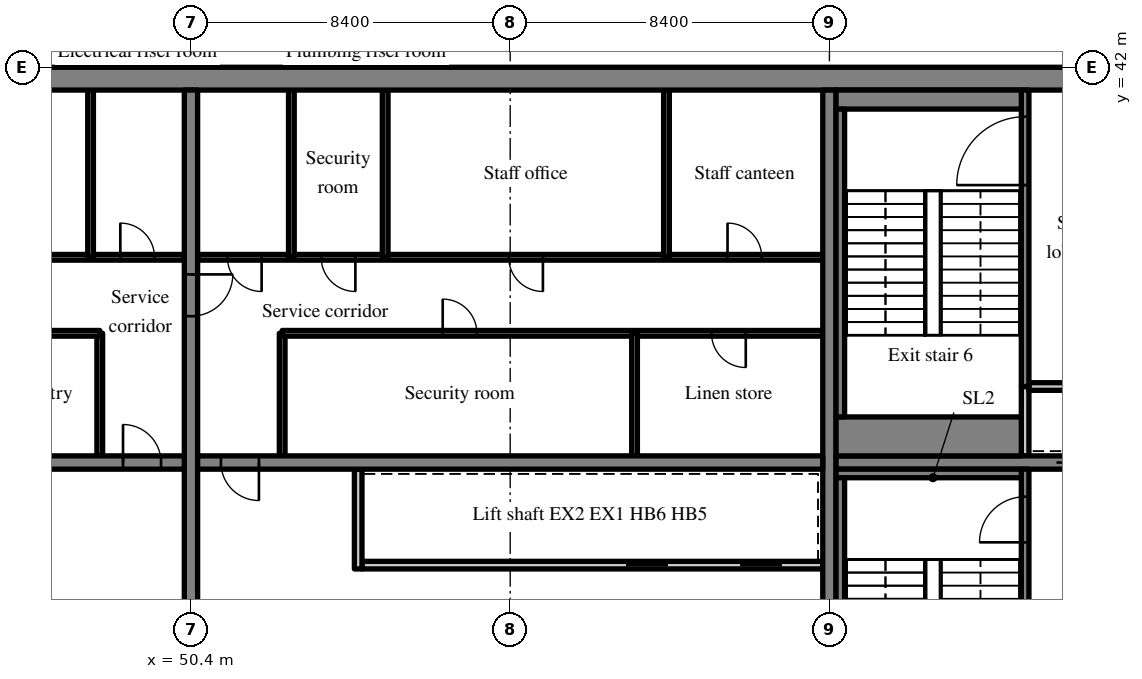
"""IFC4 building model, lengths in metres.
Left out: names, types, materials, properties, quantities, classifications, styles, units other than length and angle.
Written with IfcOpenShell. Run it as: python <this file> out.ifc"""

import sys

from ifc_helpers import new_model, si_unit, direction, frame, frame_2d, origin, place, context, subcontext, project, spatial, rectangle, extrude, source, transform, mapped, element, fill, save


model = new_model("IFC4")
c1 = context("Model", 3, precision=1e-05, world=origin(), true_north=direction((0.0, 1.0)))
c2 = subcontext(c1, "Body", "Model", "MODEL_VIEW")
j1 = project(units=[si_unit("LENGTHUNIT", "METRE"), si_unit("PLANEANGLEUNIT", "RADIAN")], contexts=[c1])
p1 = place(None, origin())
s1 = spatial("IfcSite", under=j1, at=p1, CompositionType="ELEMENT")
p2 = place(p1, origin())
s2 = spatial("IfcBuilding", under=s1, at=p2, CompositionType="ELEMENT")
p3 = place(p2, frame((0.0, 0.0, 241.3)))
s3 = spatial("IfcBuildingStorey", under=s2, at=p3, CompositionType="ELEMENT", Elevation=241.3)
m1 = source(origin(), c2, "Body", "SweptSolid", [
    extrude(rectangle(XDim=50.4, YDim=0.6, at=frame_2d((25.2, 0.0))), origin(), (0.0, 0.0, 1.0), 3.62),
])
p4 = place(p3, frame((25.2, 41.7, 0.0), z_axis=(0.0, 0.0, 1.0), x_axis=(1.0, 0.0, 0.0)))
e1 = element("IfcWall", 1, at=p4, inside=s3, PredefinedType="SHEAR", context=c2, shape_type="MappedRepresentation", body=[
    mapped(m1, transform((0.0, 0.0, 0.0), scale=1.0)),
])
m2 = source(origin(), c2, "Body", "SweptSolid", [
    extrude(rectangle(XDim=18.8, YDim=0.35, at=frame_2d((9.4, 0.0))), origin(), (0.0, 0.0, 1.0), 3.62),
])
p5 = place(p3, frame((50.4, 22.6, 0.0), z_axis=(0.0, 0.0, 1.0), x_axis=(0.0, 1.0, 0.0)))
e2 = element("IfcWall", 2, at=p5, inside=s3, PredefinedType="SHEAR", context=c2, shape_type="MappedRepresentation", body=[
    mapped(m2, transform((0.0, 0.0, 0.0), scale=1.0)),
])
m3 = source(origin(), c2, "Body", "SweptSolid", [
    extrude(rectangle(XDim=1.1, YDim=2.1, at=frame_2d((0.55, 1.05))), frame((0.0, 0.185, 0.0), z_axis=(0.0, -1.0, 0.0), x_axis=(1.0, 0.0, 0.0)), (0.0, 0.0, 1.0), 0.37),
])
p6 = place(p5, frame((12.85, 0.0, 0.0)))
e3 = element("IfcOpeningElement", 3, at=p6, cuts=e2, PredefinedType="OPENING", context=c2, shape_type="MappedRepresentation", body=[
    mapped(m3, transform((0.0, 0.0, 0.0), scale=1.0)),
])
p7 = place(p3, frame((67.2, 22.6, 0.0), z_axis=(0.0, 0.0, 1.0), x_axis=(0.0, 1.0, 0.0)))
e4 = element("IfcWall", 4, at=p7, inside=s3, PredefinedType="SHEAR", context=c2, shape_type="MappedRepresentation", body=[
    mapped(m2, transform((0.0, 0.0, 0.0), scale=1.0)),
])
m4 = source(origin(), c2, "Body", "SweptSolid", [
    extrude(rectangle(XDim=16.45, YDim=0.35, at=frame_2d((8.225, 0.0))), origin(), (0.0, 0.0, 1.0), 3.62),
])
p8 = place(p3, frame((33.775, 31.6, 0.0), z_axis=(0.0, 0.0, 1.0), x_axis=(1.0, 0.0, 0.0)))
e5 = element("IfcWall", 5, at=p8, inside=s3, PredefinedType="SHEAR", context=c2, shape_type="MappedRepresentation", body=[
    mapped(m4, transform((0.0, 0.0, 0.0), scale=1.0)),
])
m5 = source(origin(), c2, "Body", "SweptSolid", [
    extrude(rectangle(XDim=1.0, YDim=2.1, at=frame_2d((0.5, 1.05))), frame((0.0, 0.185, 0.0), z_axis=(0.0, -1.0, 0.0), x_axis=(1.0, 0.0, 0.0)), (0.0, 0.0, 1.0), 0.37),
])
p9 = place(p8, frame((14.837, 0.0, 0.0)))
e6 = element("IfcOpeningElement", 6, at=p9, cuts=e5, PredefinedType="OPENING", context=c2, shape_type="MappedRepresentation", body=[
    mapped(m5, transform((0.0, 0.0, 0.0), scale=1.0)),
])
m6 = source(origin(), c2, "Body", "SweptSolid", [
    extrude(rectangle(XDim=16.45, YDim=0.35, at=frame_2d((8.225, 0.0))), origin(), (0.0, 0.0, 1.0), 3.62),
])
p10 = place(p3, frame((50.575, 31.6, 0.0), z_axis=(0.0, 0.0, 1.0), x_axis=(1.0, 0.0, 0.0)))
e7 = element("IfcWall", 7, at=p10, inside=s3, PredefinedType="SHEAR", context=c2, shape_type="MappedRepresentation", body=[
    mapped(m6, transform((0.0, 0.0, 0.0), scale=1.0)),
])
p11 = place(p10, frame((0.613, 0.0, 0.0)))
e8 = element("IfcOpeningElement", 8, at=p11, cuts=e7, PredefinedType="OPENING", context=c2, shape_type="MappedRepresentation", body=[
    mapped(m5, transform((0.0, 0.0, 0.0), scale=1.0)),
])
m7 = source(origin(), c2, "Body", "SweptSolid", [
    extrude(rectangle(XDim=7.625, YDim=0.35, at=frame_2d((3.812, 0.0))), origin(), (0.0, 0.0, 1.0), 3.62),
])
p12 = place(p3, frame((67.375, 31.6, 0.0), z_axis=(0.0, 0.0, 1.0), x_axis=(1.0, 0.0, 0.0)))
e9 = element("IfcWall", 9, at=p12, inside=s3, PredefinedType="SHEAR", context=c2, shape_type="MappedRepresentation", body=[
    mapped(m7, transform((0.0, 0.0, 0.0), scale=1.0)),
])
p13 = place(p12, frame((5.8, 0.0, 0.0)))
e10 = element("IfcOpeningElement", 10, at=p13, cuts=e9, PredefinedType="OPENING", context=c2, shape_type="MappedRepresentation", body=[
    mapped(m3, transform((0.0, 0.0, 0.0), scale=1.0)),
])
m8 = source(origin(), c2, "Body", "SweptSolid", [
    extrude(rectangle(XDim=3.225, YDim=0.15, at=frame_2d((1.613, 0.0))), origin(), (0.0, 0.0, 1.0), 3.62),
])
p14 = place(p3, frame((48.0, 31.775, 0.0), z_axis=(0.0, 0.0, 1.0), x_axis=(0.0, 1.0, 0.0)))
e11 = element("IfcWall", 11, at=p14, inside=s3, PredefinedType="PARTITIONING", context=c2, shape_type="MappedRepresentation", body=[
    mapped(m8, transform((0.0, 0.0, 0.0), scale=1.0)),
])
m9 = source(origin(), c2, "Body", "SweptSolid", [
    extrude(rectangle(XDim=14.225, YDim=0.15, at=frame_2d((7.113, 0.0))), origin(), (0.0, 0.0, 1.0), 3.62),
])
p15 = place(p3, frame((33.775, 35.0, 0.0), z_axis=(0.0, 0.0, 1.0), x_axis=(1.0, 0.0, 0.0)))
e12 = element("IfcWall", 12, at=p15, inside=s3, PredefinedType="PARTITIONING", context=c2, shape_type="MappedRepresentation", body=[
    mapped(m9, transform((0.0, 0.0, 0.0), scale=1.0)),
])
m10 = source(origin(), c2, "Body", "SweptSolid", [
    extrude(rectangle(XDim=0.9, YDim=2.1, at=frame_2d((0.45, 1.05))), frame((0.0, 0.085, 0.0), z_axis=(0.0, -1.0, 0.0), x_axis=(1.0, 0.0, 0.0)), (0.0, 0.0, 1.0), 0.17),
])
p16 = place(p15, frame((0.965, 0.0, 0.0)))
e13 = element("IfcOpeningElement", 13, at=p16, cuts=e12, PredefinedType="OPENING", context=c2, shape_type="MappedRepresentation", body=[
    mapped(m10, transform((0.0, 0.0, 0.0), scale=1.0)),
])
p17 = place(p15, frame((5.917, 0.0, 0.0)))
e14 = element("IfcOpeningElement", 14, at=p17, cuts=e12, PredefinedType="OPENING", context=c2, shape_type="MappedRepresentation", body=[
    mapped(m10, transform((0.0, 0.0, 0.0), scale=1.0)),
])
p18 = place(p15, frame((11.577, 0.0, 0.0)))
e15 = element("IfcOpeningElement", 15, at=p18, cuts=e12, PredefinedType="OPENING", context=c2, shape_type="MappedRepresentation", body=[
    mapped(m10, transform((0.0, 0.0, 0.0), scale=1.0)),
])
m11 = source(origin(), c2, "Body", "SweptSolid", [
    extrude(rectangle(XDim=16.45, YDim=0.15, at=frame_2d((8.225, 0.0))), origin(), (0.0, 0.0, 1.0), 3.62),
])
p19 = place(p3, frame((33.775, 37.0, 0.0), z_axis=(0.0, 0.0, 1.0), x_axis=(1.0, 0.0, 0.0)))
e16 = element("IfcWall", 16, at=p19, inside=s3, PredefinedType="PARTITIONING", context=c2, shape_type="MappedRepresentation", body=[
    mapped(m11, transform((0.0, 0.0, 0.0), scale=1.0)),
])
p20 = place(p19, frame((6.541, 0.0, 0.0)))
e17 = element("IfcOpeningElement", 17, at=p20, cuts=e16, PredefinedType="OPENING", context=c2, shape_type="MappedRepresentation", body=[
    mapped(m10, transform((0.0, 0.0, 0.0), scale=1.0)),
])
p21 = place(p19, frame((14.766, 0.0, 0.0)))
e18 = element("IfcOpeningElement", 18, at=p21, cuts=e16, PredefinedType="OPENING", context=c2, shape_type="MappedRepresentation", body=[
    mapped(m10, transform((0.0, 0.0, 0.0), scale=1.0)),
])
m12 = source(origin(), c2, "Body", "SweptSolid", [
    extrude(rectangle(XDim=4.4, YDim=0.15, at=frame_2d((2.2, 0.0))), origin(), (0.0, 0.0, 1.0), 3.62),
])
p22 = place(p3, frame((47.758, 37.0, 0.0), z_axis=(0.0, 0.0, 1.0), x_axis=(0.0, 1.0, 0.0)))
e19 = element("IfcWall", 19, at=p22, inside=s3, PredefinedType="PARTITIONING", context=c2, shape_type="MappedRepresentation", body=[
    mapped(m12, transform((0.0, 0.0, 0.0), scale=1.0)),
])
m13 = source(origin(), c2, "Body", "SweptSolid", [
    extrude(rectangle(XDim=12.125, YDim=0.2, at=frame_2d((6.062, 0.0))), origin(), (0.0, 0.0, 1.0), 3.62),
])
p23 = place(p3, frame((67.025, 28.9, 0.0), z_axis=(0.0, 0.0, 1.0), x_axis=(-1.0, 0.0, 0.0)))
e20 = element("IfcWall", 20, at=p23, inside=s3, PredefinedType="SOLIDWALL", context=c2, shape_type="MappedRepresentation", body=[
    mapped(m13, transform((0.0, 0.0, 0.0), scale=1.0)),
])
m14 = source(origin(), c2, "Body", "SweptSolid", [
    extrude(rectangle(XDim=1.1, YDim=2.1, at=frame_2d((0.55, 1.05))), frame((0.0, 0.11, 0.0), z_axis=(0.0, -1.0, 0.0), x_axis=(1.0, 0.0, 0.0)), (0.0, 0.0, 1.0), 0.22),
])
p24 = place(p23, frame((1.075, 0.0, 0.0)))
e21 = element("IfcOpeningElement", 21, at=p24, cuts=e20, PredefinedType="OPENING", context=c2, shape_type="MappedRepresentation", body=[
    mapped(m14, transform((0.0, 0.0, 0.0), scale=1.0)),
])
p25 = place(p23, frame((4.075, 0.0, 0.0)))
e22 = element("IfcOpeningElement", 22, at=p25, cuts=e20, PredefinedType="OPENING", context=c2, shape_type="MappedRepresentation", body=[
    mapped(m14, transform((0.0, 0.0, 0.0), scale=1.0)),
])
m15 = source(origin(), c2, "Body", "SweptSolid", [
    extrude(rectangle(XDim=2.625, YDim=0.2, at=frame_2d((1.312, 0.0))), origin(), (0.0, 0.0, 1.0), 3.62),
])
p26 = place(p3, frame((54.8, 28.8, 0.0), z_axis=(0.0, 0.0, 1.0), x_axis=(0.0, 1.0, 0.0)))
e23 = element("IfcWall", 23, at=p26, inside=s3, PredefinedType="SOLIDWALL", context=c2, shape_type="MappedRepresentation", body=[
    mapped(m15, transform((0.0, 0.0, 0.0), scale=1.0)),
])
p27 = place(p3, frame((52.8, 31.775, 0.0), z_axis=(0.0, 0.0, 1.0), x_axis=(0.0, 1.0, 0.0)))
e24 = element("IfcWall", 24, at=p27, inside=s3, PredefinedType="PARTITIONING", context=c2, shape_type="MappedRepresentation", body=[
    mapped(m8, transform((0.0, 0.0, 0.0), scale=1.0)),
])
m16 = source(origin(), c2, "Body", "SweptSolid", [
    extrude(rectangle(XDim=14.225, YDim=0.15, at=frame_2d((7.112, 0.0))), origin(), (0.0, 0.0, 1.0), 3.62),
])
p28 = place(p3, frame((67.025, 35.0, 0.0), z_axis=(0.0, 0.0, 1.0), x_axis=(-1.0, 0.0, 0.0)))
e25 = element("IfcWall", 25, at=p28, inside=s3, PredefinedType="PARTITIONING", context=c2, shape_type="MappedRepresentation", body=[
    mapped(m16, transform((0.0, 0.0, 0.0), scale=1.0)),
])
p29 = place(p28, frame((2.026, 0.0, 0.0)))
e26 = element("IfcOpeningElement", 26, at=p29, cuts=e25, PredefinedType="OPENING", context=c2, shape_type="MappedRepresentation", body=[
    mapped(m10, transform((0.0, 0.0, 0.0), scale=1.0)),
])
p30 = place(p28, frame((9.101, 0.0, 0.0)))
e27 = element("IfcOpeningElement", 27, at=p30, cuts=e25, PredefinedType="OPENING", context=c2, shape_type="MappedRepresentation", body=[
    mapped(m10, transform((0.0, 0.0, 0.0), scale=1.0)),
])
m17 = source(origin(), c2, "Body", "SweptSolid", [
    extrude(rectangle(XDim=16.45, YDim=0.15, at=frame_2d((8.225, 0.0))), origin(), (0.0, 0.0, 1.0), 3.62),
])
p31 = place(p3, frame((67.025, 37.0, 0.0), z_axis=(0.0, 0.0, 1.0), x_axis=(-1.0, 0.0, 0.0)))
e28 = element("IfcWall", 28, at=p31, inside=s3, PredefinedType="PARTITIONING", context=c2, shape_type="MappedRepresentation", body=[
    mapped(m17, transform((0.0, 0.0, 0.0), scale=1.0)),
])
p32 = place(p31, frame((1.606, 0.0, 0.0)))
e29 = element("IfcOpeningElement", 29, at=p32, cuts=e28, PredefinedType="OPENING", context=c2, shape_type="MappedRepresentation", body=[
    mapped(m10, transform((0.0, 0.0, 0.0), scale=1.0)),
])
p33 = place(p31, frame((7.364, 0.0, 0.0)))
e30 = element("IfcOpeningElement", 30, at=p33, cuts=e28, PredefinedType="OPENING", context=c2, shape_type="MappedRepresentation", body=[
    mapped(m10, transform((0.0, 0.0, 0.0), scale=1.0)),
])
p34 = place(p31, frame((12.299, 0.0, 0.0)))
e31 = element("IfcOpeningElement", 31, at=p34, cuts=e28, PredefinedType="OPENING", context=c2, shape_type="MappedRepresentation", body=[
    mapped(m10, transform((0.0, 0.0, 0.0), scale=1.0)),
])
p35 = place(p31, frame((14.766, 0.0, 0.0)))
e32 = element("IfcOpeningElement", 32, at=p35, cuts=e28, PredefinedType="OPENING", context=c2, shape_type="MappedRepresentation", body=[
    mapped(m10, transform((0.0, 0.0, 0.0), scale=1.0)),
])
p36 = place(p3, frame((62.072, 31.775, 0.0), z_axis=(0.0, 0.0, 1.0), x_axis=(0.0, 1.0, 0.0)))
e33 = element("IfcWall", 33, at=p36, inside=s3, PredefinedType="PARTITIONING", context=c2, shape_type="MappedRepresentation", body=[
    mapped(m8, transform((0.0, 0.0, 0.0), scale=1.0)),
])
for number, where, z_axis, x_axis in (
    (34, (62.912, 37.0, 0.0), (0.0, 0.0, 1.0), (0.0, 1.0, 0.0)),
    (35, (55.51, 37.0, 0.0), (0.0, 0.0, 1.0), (0.0, 1.0, 0.0)),
    (36, (53.042, 37.0, 0.0), (0.0, 0.0, 1.0), (0.0, 1.0, 0.0)),
):
    element("IfcWall", number, at=place(p3, frame(where, z_axis=z_axis, x_axis=x_axis)), inside=s3, PredefinedType="PARTITIONING", context=c2, shape_type="MappedRepresentation", body=[
        mapped(m12, transform((0.0, 0.0, 0.0), scale=1.0)),
    ])
m18 = source(origin(), c2, "Body", "SweptSolid", [
    extrude(rectangle(XDim=8.825, YDim=0.2, at=frame_2d((4.413, 0.0))), origin(), (0.0, 0.0, 1.0), 3.62),
])
p37 = place(p3, frame((72.35, 22.6, 0.0), z_axis=(0.0, 0.0, 1.0), x_axis=(0.0, 1.0, 0.0)))
e37 = element("IfcWall", 37, at=p37, inside=s3, PredefinedType="SOLIDWALL", context=c2, shape_type="MappedRepresentation", body=[
    mapped(m18, transform((0.0, 0.0, 0.0), scale=1.0)),
])
m19 = source(origin(), c2, "Body", "SweptSolid", [
    extrude(rectangle(XDim=1.2, YDim=2.1, at=frame_2d((0.6, 1.05))), frame((0.0, 0.11, 0.0), z_axis=(0.0, -1.0, 0.0), x_axis=(1.0, 0.0, 0.0)), (0.0, 0.0, 1.0), 0.22),
])
p38 = place(p37, frame((6.9, 0.0, 0.0)))
e38 = element("IfcOpeningElement", 38, at=p38, cuts=e37, PredefinedType="OPENING", context=c2, shape_type="MappedRepresentation", body=[
    mapped(m19, transform((0.0, 0.0, 0.0), scale=1.0)),
])
m20 = source(origin(), c2, "Body", "SweptSolid", [
    extrude(rectangle(XDim=1.825, YDim=0.2, at=frame_2d((0.913, 0.0))), origin(), (0.0, 0.0, 1.0), 3.62),
])
p39 = place(p3, frame((72.35, 31.775, 0.0), z_axis=(0.0, 0.0, 1.0), x_axis=(0.0, 1.0, 0.0)))
e39 = element("IfcWall", 39, at=p39, inside=s3, PredefinedType="SOLIDWALL", context=c2, shape_type="MappedRepresentation", body=[
    mapped(m20, transform((0.0, 0.0, 0.0), scale=1.0)),
])
m21 = source(origin(), c2, "Body", "SweptSolid", [
    extrude(rectangle(XDim=2.55, YDim=0.2, at=frame_2d((1.275, 0.0))), origin(), (0.0, 0.0, 1.0), 3.62),
])
p40 = place(p3, frame((72.45, 33.6, 0.0), z_axis=(0.0, 0.0, 1.0), x_axis=(1.0, 0.0, 0.0)))
e40 = element("IfcWall", 40, at=p40, inside=s3, PredefinedType="SOLIDWALL", context=c2, shape_type="MappedRepresentation", body=[
    mapped(m21, transform((0.0, 0.0, 0.0), scale=1.0)),
])
m22 = source(origin(), c2, "Body", "SweptSolid", [
    extrude(rectangle(XDim=7.8, YDim=0.2, at=frame_2d((3.9, 0.0))), origin(), (0.0, 0.0, 1.0), 3.62),
])
p41 = place(p3, frame((72.35, 33.6, 0.0), z_axis=(0.0, 0.0, 1.0), x_axis=(0.0, 1.0, 0.0)))
e41 = element("IfcWall", 41, at=p41, inside=s3, PredefinedType="SOLIDWALL", context=c2, shape_type="MappedRepresentation", body=[
    mapped(m22, transform((0.0, 0.0, 0.0), scale=1.0)),
])
m23 = source(origin(), c2, "Body", "SweptSolid", [
    extrude(rectangle(XDim=1.8, YDim=2.1, at=frame_2d((0.9, 1.05))), frame((0.0, 0.11, 0.0), z_axis=(0.0, -1.0, 0.0), x_axis=(1.0, 0.0, 0.0)), (0.0, 0.0, 1.0), 0.22),
])
p42 = place(p41, frame((5.3, 0.0, 0.0)))
e42 = element("IfcOpeningElement", 42, at=p42, cuts=e41, PredefinedType="OPENING", context=c2, shape_type="MappedRepresentation", body=[
    mapped(m23, transform((0.0, 0.0, 0.0), scale=1.0)),
])
m24 = source(origin(), c2, "Body", "SweptSolid", [
    extrude(rectangle(XDim=4.875, YDim=0.225, at=frame_2d((2.438, 0.0))), origin(), (0.0, 0.0, 1.0), 3.62),
])
p43 = place(p3, frame((67.375, 31.312, 0.0), z_axis=(0.0, 0.0, 1.0), x_axis=(1.0, 0.0, 0.0)))
e43 = element("IfcWall", 43, at=p43, inside=s3, PredefinedType="SOLIDWALL", context=c2, shape_type="MappedRepresentation", body=[
    mapped(m24, transform((0.0, 0.0, 0.0), scale=1.0)),
])
m25 = source(origin(), c2, "Body", "SweptSolid", [
    extrude(rectangle(XDim=8.1, YDim=0.225, at=frame_2d((4.05, 0.0))), origin(), (0.0, 0.0, 1.0), 3.62),
])
p44 = place(p3, frame((67.487, 23.1, 0.0), z_axis=(0.0, 0.0, 1.0), x_axis=(0.0, 1.0, 0.0)))
e44 = element("IfcWall", 44, at=p44, inside=s3, PredefinedType="SOLIDWALL", context=c2, shape_type="MappedRepresentation", body=[
    mapped(m25, transform((0.0, 0.0, 0.0), scale=1.0)),
])
m26 = source(origin(), c2, "Body", "SweptSolid", [
    extrude(rectangle(XDim=4.875, YDim=0.5, at=frame_2d((2.438, 0.0))), origin(), (0.0, 0.0, 1.0), 3.62),
])
p45 = place(p3, frame((67.375, 41.15, 0.0), z_axis=(0.0, 0.0, 1.0), x_axis=(1.0, 0.0, 0.0)))
e45 = element("IfcWall", 45, at=p45, inside=s3, PredefinedType="SOLIDWALL", context=c2, shape_type="MappedRepresentation", body=[
    mapped(m26, transform((0.0, 0.0, 0.0), scale=1.0)),
])
m27 = source(origin(), c2, "Body", "SweptSolid", [
    extrude(rectangle(XDim=4.875, YDim=1.025, at=frame_2d((2.438, 0.0))), origin(), (0.0, 0.0, 1.0), 3.62),
])
p46 = place(p3, frame((67.375, 32.287, 0.0), z_axis=(0.0, 0.0, 1.0), x_axis=(1.0, 0.0, 0.0)))
e46 = element("IfcWall", 46, at=p46, inside=s3, PredefinedType="SOLIDWALL", context=c2, shape_type="MappedRepresentation", body=[
    mapped(m27, transform((0.0, 0.0, 0.0), scale=1.0)),
])
p47 = place(p3, frame((67.487, 32.8, 0.0), z_axis=(0.0, 0.0, 1.0), x_axis=(0.0, 1.0, 0.0)))
e47 = element("IfcWall", 47, at=p47, inside=s3, PredefinedType="SOLIDWALL", context=c2, shape_type="MappedRepresentation", body=[
    mapped(m25, transform((0.0, 0.0, 0.0), scale=1.0)),
])
m28 = source(origin(), c2, "Body", "SweptSolid", [
    extrude(rectangle(XDim=1.0, YDim=2.1, at=frame_2d((0.5, 1.05))), frame((0.0, 0.025, 0.0), z_axis=(0.0, -1.0, 0.0), x_axis=(1.0, 0.0, 0.0)), (0.0, 0.0, 1.0), 0.05),
])
p48 = place(p9, origin())
e48 = element("IfcDoor", 48, at=p48, inside=s3, OperationType="SINGLE_SWING_LEFT", PredefinedType="DOOR", context=c2, shape_type="MappedRepresentation", body=[
    mapped(m28, transform((0.0, 0.0, 0.0), scale=1.0)),
])
fill(e6, e48)
m29 = source(origin(), c2, "Body", "SweptSolid", [
    extrude(rectangle(XDim=0.9, YDim=2.1, at=frame_2d((0.45, 1.05))), frame((0.0, 0.025, 0.0), z_axis=(0.0, -1.0, 0.0), x_axis=(1.0, 0.0, 0.0)), (0.0, 0.0, 1.0), 0.05),
])
p49 = place(p21, origin())
e49 = element("IfcDoor", 49, at=p49, inside=s3, OperationType="SINGLE_SWING_LEFT", PredefinedType="DOOR", context=c2, shape_type="MappedRepresentation", body=[
    mapped(m29, transform((0.0, 0.0, 0.0), scale=1.0)),
])
fill(e18, e49)
p50 = place(p11, origin())
e50 = element("IfcDoor", 50, at=p50, inside=s3, OperationType="SINGLE_SWING_RIGHT", PredefinedType="DOOR", context=c2, shape_type="MappedRepresentation", body=[
    mapped(m28, transform((0.0, 0.0, 0.0), scale=1.0)),
])
fill(e8, e50)
m30 = source(origin(), c2, "Body", "SweptSolid", [
    extrude(rectangle(XDim=1.1, YDim=2.1, at=frame_2d((0.55, 1.05))), frame((0.0, 0.025, 0.0), z_axis=(0.0, -1.0, 0.0), x_axis=(1.0, 0.0, 0.0)), (0.0, 0.0, 1.0), 0.05),
])
p51 = place(p24, origin())
e51 = element("IfcDoor", 51, at=p51, inside=s3, OperationType="SLIDING_TO_RIGHT", PredefinedType="DOOR", context=c2, shape_type="MappedRepresentation", body=[
    mapped(m30, transform((0.0, 0.0, 0.0), scale=1.0)),
])
fill(e21, e51)
p52 = place(p25, origin())
e52 = element("IfcDoor", 52, at=p52, inside=s3, OperationType="SLIDING_TO_LEFT", PredefinedType="DOOR", context=c2, shape_type="MappedRepresentation", body=[
    mapped(m30, transform((0.0, 0.0, 0.0), scale=1.0)),
])
fill(e22, e52)
p53 = place(p29, origin())
e53 = element("IfcDoor", 53, at=p53, inside=s3, OperationType="SINGLE_SWING_LEFT", PredefinedType="DOOR", context=c2, shape_type="MappedRepresentation", body=[
    mapped(m29, transform((0.0, 0.0, 0.0), scale=1.0)),
])
fill(e26, e53)
p54 = place(p30, origin())
e54 = element("IfcDoor", 54, at=p54, inside=s3, OperationType="SINGLE_SWING_RIGHT", PredefinedType="DOOR", context=c2, shape_type="MappedRepresentation", body=[
    mapped(m29, transform((0.0, 0.0, 0.0), scale=1.0)),
])
fill(e27, e54)
p55 = place(p32, origin())
e55 = element("IfcDoor", 55, at=p55, inside=s3, OperationType="SINGLE_SWING_RIGHT", PredefinedType="DOOR", context=c2, shape_type="MappedRepresentation", body=[
    mapped(m29, transform((0.0, 0.0, 0.0), scale=1.0)),
])
fill(e29, e55)
p56 = place(p33, origin())
e56 = element("IfcDoor", 56, at=p56, inside=s3, OperationType="SINGLE_SWING_LEFT", PredefinedType="DOOR", context=c2, shape_type="MappedRepresentation", body=[
    mapped(m29, transform((0.0, 0.0, 0.0), scale=1.0)),
])
fill(e30, e56)
p57 = place(p34, origin())
e57 = element("IfcDoor", 57, at=p57, inside=s3, OperationType="SINGLE_SWING_LEFT", PredefinedType="DOOR", context=c2, shape_type="MappedRepresentation", body=[
    mapped(m29, transform((0.0, 0.0, 0.0), scale=1.0)),
])
fill(e31, e57)
p58 = place(p35, origin())
e58 = element("IfcDoor", 58, at=p58, inside=s3, OperationType="SINGLE_SWING_LEFT", PredefinedType="DOOR", context=c2, shape_type="MappedRepresentation", body=[
    mapped(m29, transform((0.0, 0.0, 0.0), scale=1.0)),
])
fill(e32, e58)
m31 = source(origin(), c2, "Body", "SweptSolid", [
    extrude(rectangle(XDim=1.2, YDim=2.1, at=frame_2d((0.6, 1.05))), frame((0.0, 0.025, 0.0), z_axis=(0.0, -1.0, 0.0), x_axis=(1.0, 0.0, 0.0)), (0.0, 0.0, 1.0), 0.05),
])
p59 = place(p38, origin())
e59 = element("IfcDoor", 59, at=p59, inside=s3, OperationType="SINGLE_SWING_LEFT", PredefinedType="DOOR", context=c2, shape_type="MappedRepresentation", body=[
    mapped(m31, transform((0.0, 0.0, 0.0), scale=1.0)),
])
fill(e38, e59)
p60 = place(p13, origin())
e60 = element("IfcDoor", 60, at=p60, inside=s3, OperationType="SLIDING_TO_RIGHT", PredefinedType="DOOR", context=c2, shape_type="MappedRepresentation", body=[
    mapped(m30, transform((0.0, 0.0, 0.0), scale=1.0)),
])
fill(e10, e60)
m32 = source(origin(), c2, "Body", "SweptSolid", [
    extrude(rectangle(XDim=1.8, YDim=2.1, at=frame_2d((0.9, 1.05))), frame((0.0, 0.025, 0.0), z_axis=(0.0, -1.0, 0.0), x_axis=(1.0, 0.0, 0.0)), (0.0, 0.0, 1.0), 0.05),
])
p61 = place(p42, origin())
e61 = element("IfcDoor", 61, at=p61, inside=s3, OperationType="SINGLE_SWING_LEFT", PredefinedType="DOOR", context=c2, shape_type="MappedRepresentation", body=[
    mapped(m32, transform((0.0, 0.0, 0.0), scale=1.0)),
])
fill(e42, e61)
p62 = place(p6, origin())
e62 = element("IfcDoor", 62, at=p62, inside=s3, OperationType="SINGLE_SWING_RIGHT", PredefinedType="DOOR", context=c2, shape_type="MappedRepresentation", body=[
    mapped(m30, transform((0.0, 0.0, 0.0), scale=1.0)),
])
fill(e3, e62)
save(model, sys.argv[1])
